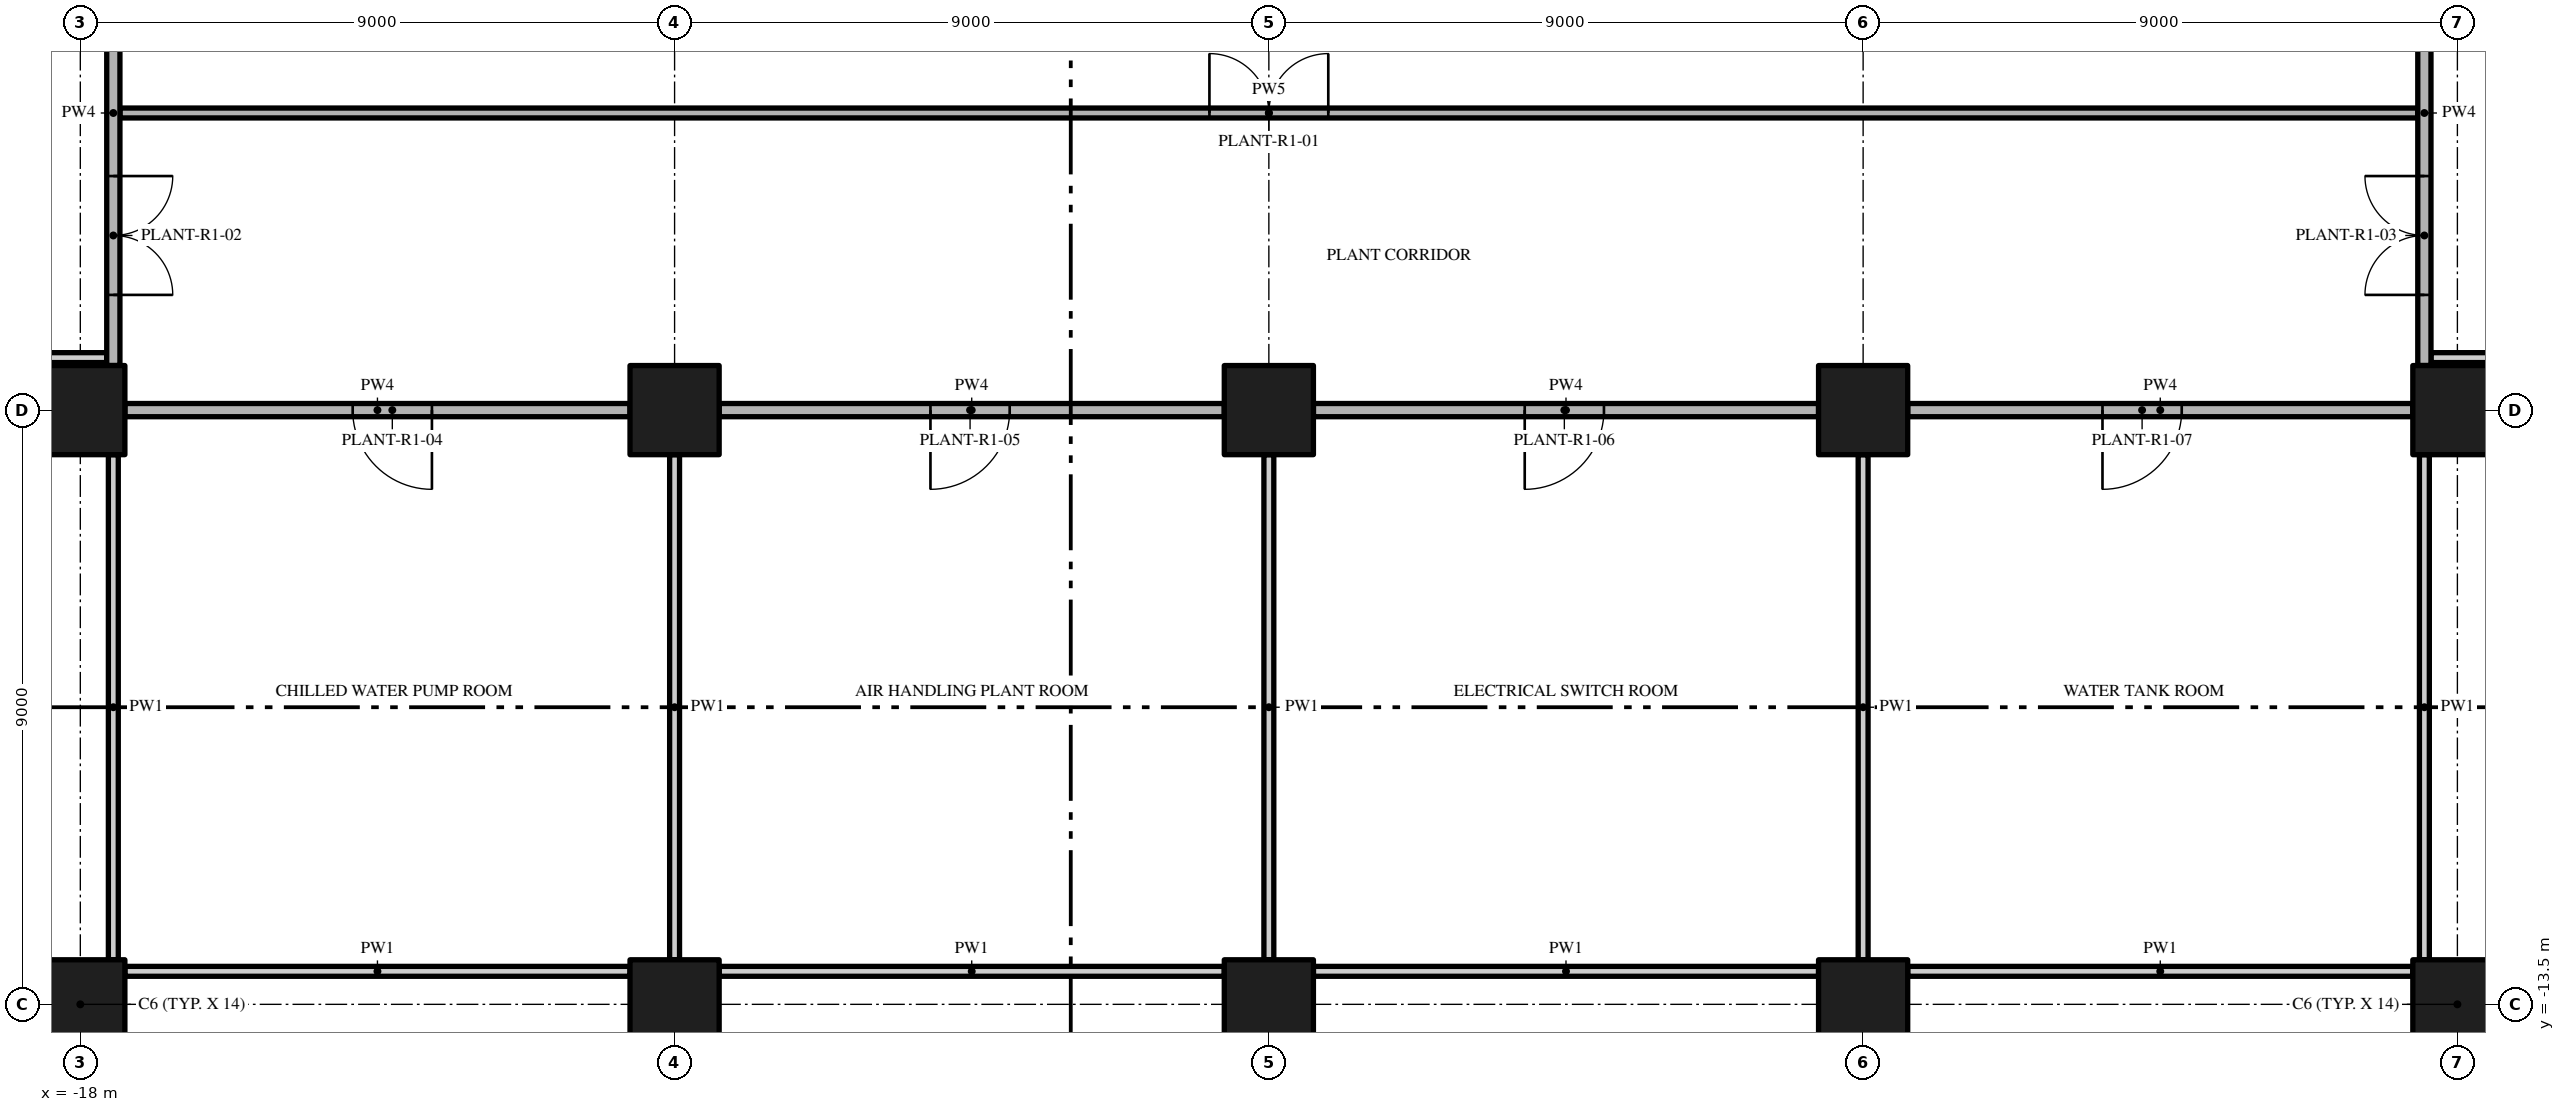
"""IFC4 building model, lengths in metres.
Left out: names, types, materials, properties, quantities, classifications, styles, units other than length and angle.
Written with IfcOpenShell. Run it as: python <this file> out.ifc"""

import sys

from ifc_helpers import new_model, si_unit, direction, frame, frame_2d, origin, origin_2d, place, context, subcontext, project, spatial, rectangle, extrude, element, fill, save


model = new_model("IFC4")
c1 = context("Model", 3, precision=1e-05, world=origin(), true_north=direction((0.0, 1.0)))
c2 = subcontext(c1, "Body", "Model", "MODEL_VIEW")
j1 = project(units=[si_unit("LENGTHUNIT", "METRE"), si_unit("PLANEANGLEUNIT", "RADIAN")], contexts=[c1])
p1 = place(None, origin())
s1 = spatial("IfcSite", under=j1, at=p1, CompositionType="ELEMENT")
p2 = place(p1, origin())
s2 = spatial("IfcBuilding", under=s1, at=p2, CompositionType="ELEMENT")
p3 = place(p2, frame((0.0, 0.0, 115.0)))
s3 = spatial("IfcBuildingStorey", under=s2, at=p3, CompositionType="ELEMENT", Elevation=115.0)
for number, where, z_axis, x_axis in (
    (1, (-18.0, -13.5, 0.0), (0.0, 0.0, 1.0), (1.0, 0.0, 0.0)),
    (2, (-18.0, -4.5, 0.0), (0.0, 0.0, 1.0), (1.0, 0.0, 0.0)),
    (3, (-9.0, -13.5, 0.0), (0.0, 0.0, 1.0), (1.0, 0.0, 0.0)),
    (4, (-9.0, -4.5, 0.0), (0.0, 0.0, 1.0), (1.0, 0.0, 0.0)),
    (5, (0.0, -13.5, 0.0), (0.0, 0.0, 1.0), (1.0, 0.0, 0.0)),
    (6, (0.0, -4.5, 0.0), (0.0, 0.0, 1.0), (1.0, 0.0, 0.0)),
    (7, (18.0, -13.5, 0.0), (0.0, 0.0, 1.0), (1.0, 0.0, 0.0)),
    (8, (18.0, -4.5, 0.0), (0.0, 0.0, 1.0), (1.0, 0.0, 0.0)),
    (9, (9.0, -13.5, 0.0), (0.0, 0.0, 1.0), (1.0, 0.0, 0.0)),
    (10, (9.0, -4.5, 0.0), (0.0, 0.0, 1.0), (1.0, 0.0, 0.0)),
):
    element("IfcColumn", number, at=place(p3, frame(where, z_axis=z_axis, x_axis=x_axis)), inside=s3, PredefinedType="COLUMN", context=c2, shape_type="SweptSolid", body=[
        extrude(rectangle(XDim=1.35, YDim=1.35, at=origin_2d()), origin(), (0.0, 0.0, 1.0), 4.7),
    ])
for number, where, z_axis, x_axis in (
    (11, (-17.325, -13.0, 0.0), (0.0, 0.0, 1.0), (1.0, 0.0, 0.0)),
    (12, (-8.325, -13.0, 0.0), (0.0, 0.0, 1.0), (1.0, 0.0, 0.0)),
    (13, (0.675, -13.0, 0.0), (0.0, 0.0, 1.0), (1.0, 0.0, 0.0)),
    (14, (9.675, -13.0, 0.0), (0.0, 0.0, 1.0), (1.0, 0.0, 0.0)),
):
    element("IfcWall", number, at=place(p3, frame(where, z_axis=z_axis, x_axis=x_axis)), inside=s3, PredefinedType="PARTITIONING", context=c2, shape_type="SweptSolid", body=[
        extrude(rectangle(XDim=7.65, YDim=0.15, at=frame_2d((3.825, 0.0))), origin(), (0.0, 0.0, 1.0), 4.7),
    ])
p4 = place(p3, frame((-9.675, -4.5, 0.0), z_axis=(0.0, 0.0, 1.0), x_axis=(-1.0, 0.0, 0.0)))
e15 = element("IfcWall", 15, at=p4, inside=s3, PredefinedType="PARTITIONING", context=c2, shape_type="SweptSolid", body=[
    extrude(rectangle(XDim=7.65, YDim=0.2, at=frame_2d((3.825, 0.0))), origin(), (0.0, 0.0, 1.0), 4.7),
])
p5 = place(p4, frame((3.0, 0.0, 0.0)))
e16 = element("IfcOpeningElement", 16, at=p5, cuts=e15, PredefinedType="OPENING", context=c2, shape_type="SweptSolid", body=[
    extrude(rectangle(XDim=1.2, YDim=2.4, at=frame_2d((0.6, 1.2))), frame((0.0, 0.11, 0.0), z_axis=(0.0, -1.0, 0.0), x_axis=(1.0, 0.0, 0.0)), (0.0, 0.0, 1.0), 0.22),
])
p6 = place(p3, frame((-0.675, -4.5, 0.0), z_axis=(0.0, 0.0, 1.0), x_axis=(-1.0, 0.0, 0.0)))
e17 = element("IfcWall", 17, at=p6, inside=s3, PredefinedType="PARTITIONING", context=c2, shape_type="SweptSolid", body=[
    extrude(rectangle(XDim=7.65, YDim=0.2, at=frame_2d((3.825, 0.0))), origin(), (0.0, 0.0, 1.0), 4.7),
])
p7 = place(p6, frame((3.25, 0.0, 0.0)))
e18 = element("IfcOpeningElement", 18, at=p7, cuts=e17, PredefinedType="OPENING", context=c2, shape_type="SweptSolid", body=[
    extrude(rectangle(XDim=1.2, YDim=2.4, at=frame_2d((0.6, 1.2))), frame((0.0, 0.11, 0.0), z_axis=(0.0, -1.0, 0.0), x_axis=(1.0, 0.0, 0.0)), (0.0, 0.0, 1.0), 0.22),
])
p8 = place(p3, frame((8.325, -4.5, 0.0), z_axis=(0.0, 0.0, 1.0), x_axis=(-1.0, 0.0, 0.0)))
e19 = element("IfcWall", 19, at=p8, inside=s3, PredefinedType="PARTITIONING", context=c2, shape_type="SweptSolid", body=[
    extrude(rectangle(XDim=7.65, YDim=0.2, at=frame_2d((3.825, 0.0))), origin(), (0.0, 0.0, 1.0), 4.7),
])
p9 = place(p8, frame((3.25, 0.0, 0.0)))
e20 = element("IfcOpeningElement", 20, at=p9, cuts=e19, PredefinedType="OPENING", context=c2, shape_type="SweptSolid", body=[
    extrude(rectangle(XDim=1.2, YDim=2.4, at=frame_2d((0.6, 1.2))), frame((0.0, 0.11, 0.0), z_axis=(0.0, -1.0, 0.0), x_axis=(1.0, 0.0, 0.0)), (0.0, 0.0, 1.0), 0.22),
])
p10 = place(p3, frame((17.325, -4.5, 0.0), z_axis=(0.0, 0.0, 1.0), x_axis=(-1.0, 0.0, 0.0)))
e21 = element("IfcWall", 21, at=p10, inside=s3, PredefinedType="PARTITIONING", context=c2, shape_type="SweptSolid", body=[
    extrude(rectangle(XDim=7.65, YDim=0.2, at=frame_2d((3.825, 0.0))), origin(), (0.0, 0.0, 1.0), 4.7),
])
p11 = place(p10, frame((3.5, 0.0, 0.0)))
e22 = element("IfcOpeningElement", 22, at=p11, cuts=e21, PredefinedType="OPENING", context=c2, shape_type="SweptSolid", body=[
    extrude(rectangle(XDim=1.2, YDim=2.4, at=frame_2d((0.6, 1.2))), frame((0.0, 0.11, 0.0), z_axis=(0.0, -1.0, 0.0), x_axis=(1.0, 0.0, 0.0)), (0.0, 0.0, 1.0), 0.22),
])
for number, where, z_axis, x_axis in (
    (23, (-22.2, -3.705, 0.0), (0.0, 0.0, 1.0), (1.0, 0.0, 0.0)),
    (24, (17.6, -3.705, 0.0), (0.0, 0.0, 1.0), (1.0, 0.0, 0.0)),
):
    element("IfcWall", number, at=place(p3, frame(where, z_axis=z_axis, x_axis=x_axis)), inside=s3, PredefinedType="PARTITIONING", context=c2, shape_type="SweptSolid", body=[
        extrude(rectangle(XDim=4.6, YDim=0.15, at=frame_2d((2.3, 0.0))), origin(), (0.0, 0.0, 1.0), 4.7),
    ])
p12 = place(p3, frame((-17.4, 0.0, 0.0), z_axis=(0.0, 0.0, 1.0), x_axis=(1.0, 0.0, 0.0)))
e25 = element("IfcWall", 25, at=p12, inside=s3, PredefinedType="PARTITIONING", context=c2, shape_type="SweptSolid", body=[
    extrude(rectangle(XDim=34.8, YDim=0.15, at=frame_2d((17.4, 0.0))), origin(), (0.0, 0.0, 1.0), 4.7),
])
p13 = place(p12, frame((16.5, 0.0, 0.0)))
e26 = element("IfcOpeningElement", 26, at=p13, cuts=e25, PredefinedType="OPENING", context=c2, shape_type="SweptSolid", body=[
    extrude(rectangle(XDim=1.8, YDim=2.4, at=frame_2d((0.9, 1.2))), frame((0.0, 0.085, 0.0), z_axis=(0.0, -1.0, 0.0), x_axis=(1.0, 0.0, 0.0)), (0.0, 0.0, 1.0), 0.17),
])
p14 = place(p3, frame((-17.5, 3.825, 0.0), z_axis=(0.0, 0.0, 1.0), x_axis=(0.0, -1.0, 0.0)))
e27 = element("IfcWall", 27, at=p14, inside=s3, PredefinedType="PARTITIONING", context=c2, shape_type="SweptSolid", body=[
    extrude(rectangle(XDim=7.65, YDim=0.2, at=frame_2d((3.825, 0.0))), origin(), (0.0, 0.0, 1.0), 4.7),
])
p15 = place(p14, frame((4.78, 0.0, 0.0)))
e28 = element("IfcOpeningElement", 28, at=p15, cuts=e27, PredefinedType="OPENING", context=c2, shape_type="SweptSolid", body=[
    extrude(rectangle(XDim=1.8, YDim=2.4, at=frame_2d((0.9, 1.2))), frame((0.0, 0.11, 0.0), z_axis=(0.0, -1.0, 0.0), x_axis=(1.0, 0.0, 0.0)), (0.0, 0.0, 1.0), 0.22),
])
for number, where, z_axis, x_axis in (
    (29, (-17.5, -12.825, 0.0), (0.0, 0.0, 1.0), (0.0, 1.0, 0.0)),
    (30, (-9.0, -12.825, 0.0), (0.0, 0.0, 1.0), (0.0, 1.0, 0.0)),
    (31, (0.0, -12.825, 0.0), (0.0, 0.0, 1.0), (0.0, 1.0, 0.0)),
    (32, (9.0, -12.825, 0.0), (0.0, 0.0, 1.0), (0.0, 1.0, 0.0)),
):
    element("IfcWall", number, at=place(p3, frame(where, z_axis=z_axis, x_axis=x_axis)), inside=s3, PredefinedType="PARTITIONING", context=c2, shape_type="SweptSolid", body=[
        extrude(rectangle(XDim=7.65, YDim=0.15, at=frame_2d((3.825, 0.0))), origin(), (0.0, 0.0, 1.0), 4.7),
    ])
p16 = place(p3, frame((17.5, -3.825, 0.0), z_axis=(0.0, 0.0, 1.0), x_axis=(0.0, 1.0, 0.0)))
e33 = element("IfcWall", 33, at=p16, inside=s3, PredefinedType="PARTITIONING", context=c2, shape_type="SweptSolid", body=[
    extrude(rectangle(XDim=7.65, YDim=0.2, at=frame_2d((3.825, 0.0))), origin(), (0.0, 0.0, 1.0), 4.7),
])
p17 = place(p16, frame((1.07, 0.0, 0.0)))
e34 = element("IfcOpeningElement", 34, at=p17, cuts=e33, PredefinedType="OPENING", context=c2, shape_type="SweptSolid", body=[
    extrude(rectangle(XDim=1.8, YDim=2.4, at=frame_2d((0.9, 1.2))), frame((0.0, 0.11, 0.0), z_axis=(0.0, -1.0, 0.0), x_axis=(1.0, 0.0, 0.0)), (0.0, 0.0, 1.0), 0.22),
])
p18 = place(p3, frame((17.5, -12.825, 0.0), z_axis=(0.0, 0.0, 1.0), x_axis=(0.0, 1.0, 0.0)))
e35 = element("IfcWall", 35, at=p18, inside=s3, PredefinedType="PARTITIONING", context=c2, shape_type="SweptSolid", body=[
    extrude(rectangle(XDim=7.65, YDim=0.15, at=frame_2d((3.825, 0.0))), origin(), (0.0, 0.0, 1.0), 4.7),
])
p19 = place(p13, origin())
e36 = element("IfcDoor", 36, at=p19, inside=s3, OperationType="DOUBLE_DOOR_SINGLE_SWING", PredefinedType="DOOR", context=c2, shape_type="SweptSolid", body=[
    extrude(rectangle(XDim=1.8, YDim=2.4, at=frame_2d((0.9, 1.2))), frame((0.0, 0.025, 0.0), z_axis=(0.0, -1.0, 0.0), x_axis=(1.0, 0.0, 0.0)), (0.0, 0.0, 1.0), 0.05),
])
fill(e26, e36)
p20 = place(p15, origin())
e37 = element("IfcDoor", 37, at=p20, inside=s3, OperationType="DOUBLE_DOOR_SINGLE_SWING", PredefinedType="DOOR", context=c2, shape_type="SweptSolid", body=[
    extrude(rectangle(XDim=1.8, YDim=2.4, at=frame_2d((0.9, 1.2))), frame((0.0, 0.025, 0.0), z_axis=(0.0, -1.0, 0.0), x_axis=(1.0, 0.0, 0.0)), (0.0, 0.0, 1.0), 0.05),
])
fill(e28, e37)
p21 = place(p17, origin())
e38 = element("IfcDoor", 38, at=p21, inside=s3, OperationType="DOUBLE_DOOR_SINGLE_SWING", PredefinedType="DOOR", context=c2, shape_type="SweptSolid", body=[
    extrude(rectangle(XDim=1.8, YDim=2.4, at=frame_2d((0.9, 1.2))), frame((0.0, 0.025, 0.0), z_axis=(0.0, -1.0, 0.0), x_axis=(1.0, 0.0, 0.0)), (0.0, 0.0, 1.0), 0.05),
])
fill(e34, e38)
p22 = place(p5, origin())
e39 = element("IfcDoor", 39, at=p22, inside=s3, OperationType="SINGLE_SWING_LEFT", PredefinedType="DOOR", context=c2, shape_type="SweptSolid", body=[
    extrude(rectangle(XDim=1.2, YDim=2.4, at=frame_2d((0.6, 1.2))), frame((0.0, 0.025, 0.0), z_axis=(0.0, -1.0, 0.0), x_axis=(1.0, 0.0, 0.0)), (0.0, 0.0, 1.0), 0.05),
])
fill(e16, e39)
p23 = place(p7, origin())
e40 = element("IfcDoor", 40, at=p23, inside=s3, OperationType="SINGLE_SWING_RIGHT", PredefinedType="DOOR", context=c2, shape_type="SweptSolid", body=[
    extrude(rectangle(XDim=1.2, YDim=2.4, at=frame_2d((0.6, 1.2))), frame((0.0, 0.025, 0.0), z_axis=(0.0, -1.0, 0.0), x_axis=(1.0, 0.0, 0.0)), (0.0, 0.0, 1.0), 0.05),
])
fill(e18, e40)
p24 = place(p9, origin())
e41 = element("IfcDoor", 41, at=p24, inside=s3, OperationType="SINGLE_SWING_RIGHT", PredefinedType="DOOR", context=c2, shape_type="SweptSolid", body=[
    extrude(rectangle(XDim=1.2, YDim=2.4, at=frame_2d((0.6, 1.2))), frame((0.0, 0.025, 0.0), z_axis=(0.0, -1.0, 0.0), x_axis=(1.0, 0.0, 0.0)), (0.0, 0.0, 1.0), 0.05),
])
fill(e20, e41)
p25 = place(p11, origin())
e42 = element("IfcDoor", 42, at=p25, inside=s3, OperationType="SINGLE_SWING_RIGHT", PredefinedType="DOOR", context=c2, shape_type="SweptSolid", body=[
    extrude(rectangle(XDim=1.2, YDim=2.4, at=frame_2d((0.6, 1.2))), frame((0.0, 0.025, 0.0), z_axis=(0.0, -1.0, 0.0), x_axis=(1.0, 0.0, 0.0)), (0.0, 0.0, 1.0), 0.05),
])
fill(e22, e42)
save(model, sys.argv[1])
